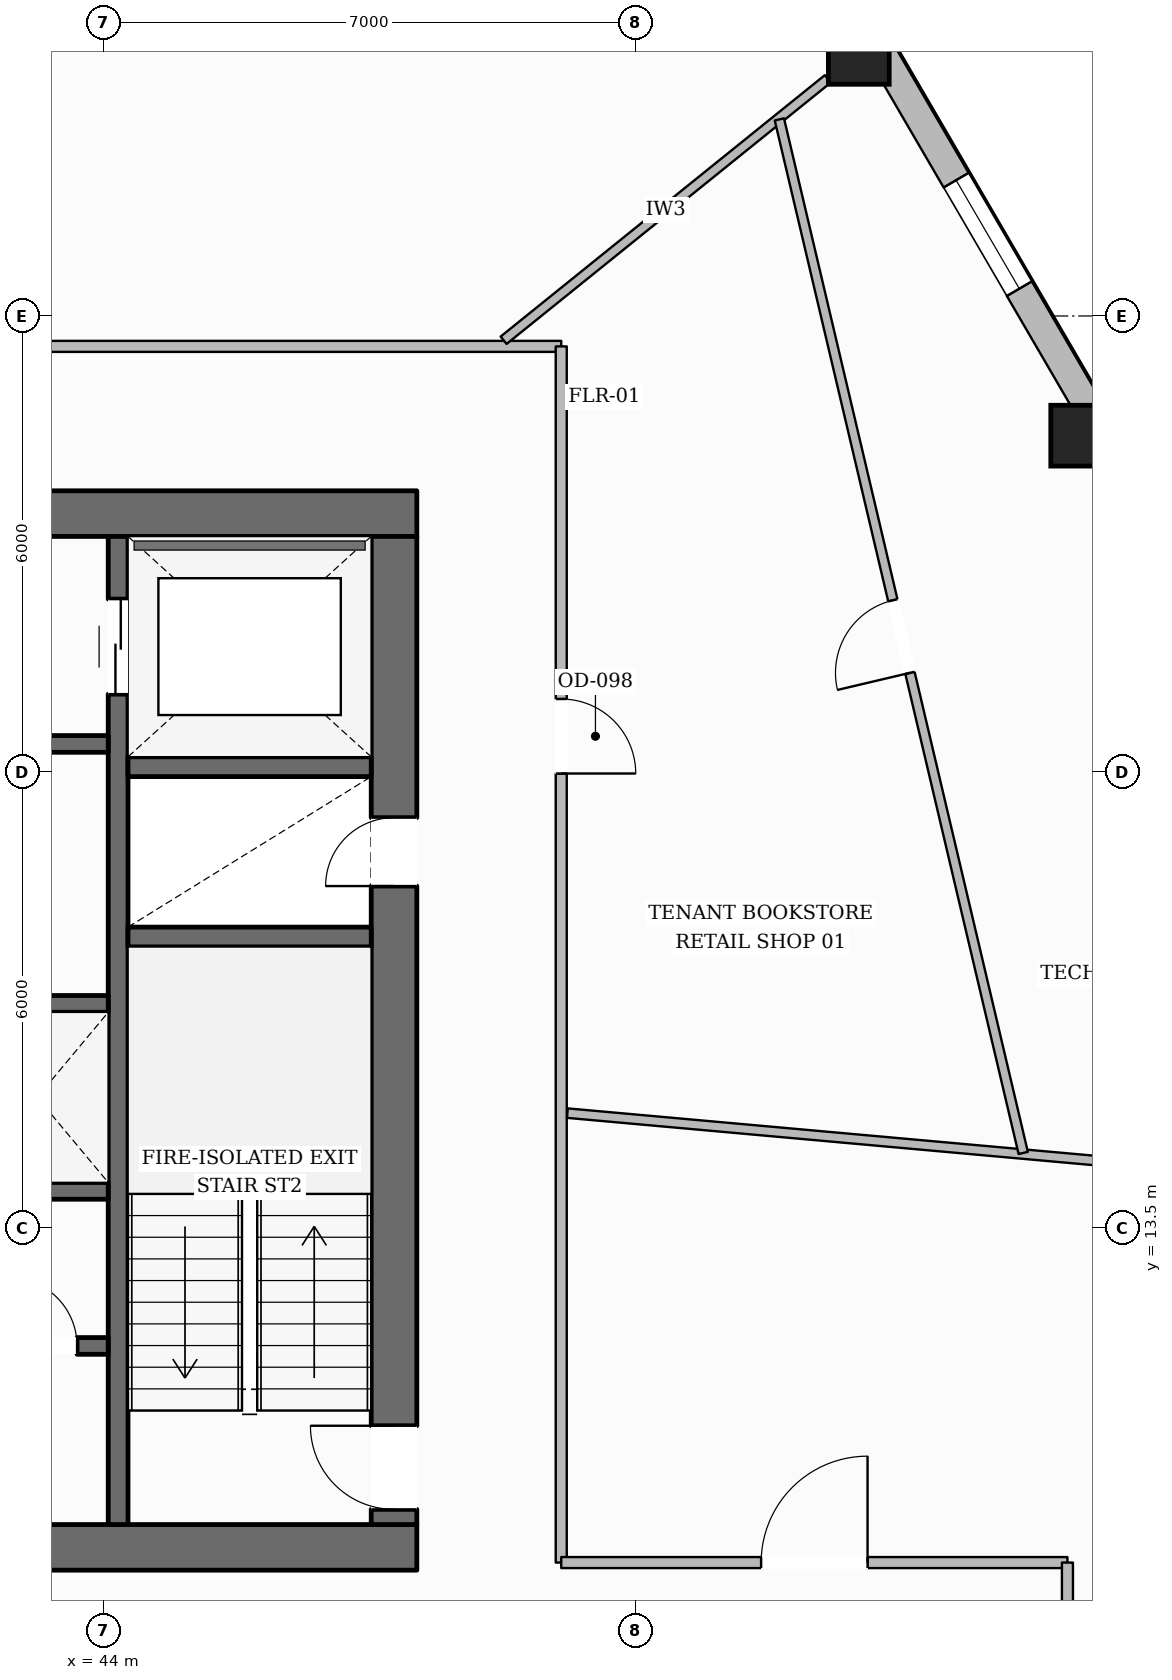
"""IFC4 building model, lengths in metres.
Left out: names, types, materials, properties, quantities, classifications, styles, units other than length and angle.
Written with IfcOpenShell. Run it as: python <this file> out.ifc"""

import sys

from ifc_helpers import new_model, si_unit, direction, frame, frame_2d, origin, origin_2d, place, context, subcontext, project, spatial, rectangle, hollow_rectangle, extrude, element, fill, save


model = new_model("IFC4")
c1 = context("Model", 3, precision=1e-05, world=origin(), true_north=direction((0.0, 1.0)))
c2 = subcontext(c1, "Body", "Model", "MODEL_VIEW")
j1 = project(units=[si_unit("LENGTHUNIT", "METRE"), si_unit("PLANEANGLEUNIT", "RADIAN")], contexts=[c1])
p1 = place(None, origin())
s1 = spatial("IfcSite", under=j1, at=p1, CompositionType="ELEMENT")
p2 = place(p1, origin())
s2 = spatial("IfcBuilding", under=s1, at=p2, CompositionType="ELEMENT")
p3 = place(p2, frame((0.0, 0.0, 63.75)))
s3 = spatial("IfcBuildingStorey", under=s2, at=p3, CompositionType="ELEMENT", Elevation=63.75)
p4 = place(p3, frame((27.88, 9.3, 0.0), z_axis=(0.0, 0.0, 1.0), x_axis=(1.0, 0.0, 0.0)))
e1 = element("IfcWall", 1, at=p4, inside=s3, PredefinedType="SOLIDWALL", context=c2, shape_type="SweptSolid", body=[
    extrude(rectangle(XDim=20.24, YDim=0.6, at=frame_2d((10.12, 0.0))), origin(), (0.0, 0.0, 1.0), 3.59),
])
p5 = place(p4, frame((10.62, 0.0, 0.0)))
e2 = element("IfcOpeningElement", 2, at=p5, cuts=e1, PredefinedType="OPENING", context=c2, shape_type="SweptSolid", body=[
    extrude(rectangle(XDim=1.4, YDim=2.2, at=frame_2d((0.7, 1.1))), frame((0.0, 0.31, 0.0), z_axis=(0.0, -1.0, 0.0), x_axis=(1.0, 0.0, 0.0)), (0.0, 0.0, 1.0), 0.62),
])
p6 = place(p3, frame((27.88, 22.9, 0.0), z_axis=(0.0, 0.0, 1.0), x_axis=(1.0, 0.0, 0.0)))
e3 = element("IfcWall", 3, at=p6, inside=s3, PredefinedType="SOLIDWALL", context=c2, shape_type="SweptSolid", body=[
    extrude(rectangle(XDim=20.24, YDim=0.6, at=frame_2d((10.12, 0.0))), origin(), (0.0, 0.0, 1.0), 3.59),
])
p7 = place(p6, frame((6.395, 0.0, 0.0)))
e4 = element("IfcOpeningElement", 4, at=p7, cuts=e3, PredefinedType="OPENING", context=c2, shape_type="SweptSolid", body=[
    extrude(rectangle(XDim=1.05, YDim=2.15, at=frame_2d((0.525, 1.075))), frame((0.0, 0.31, 0.0), z_axis=(0.0, -1.0, 0.0), x_axis=(1.0, 0.0, 0.0)), (0.0, 0.0, 1.0), 0.62),
])
p8 = place(p6, frame((12.795, 0.0, 0.0)))
e5 = element("IfcOpeningElement", 5, at=p8, cuts=e3, PredefinedType="OPENING", context=c2, shape_type="SweptSolid", body=[
    extrude(rectangle(XDim=1.05, YDim=2.15, at=frame_2d((0.525, 1.075))), frame((0.0, 0.31, 0.0), z_axis=(0.0, -1.0, 0.0), x_axis=(1.0, 0.0, 0.0)), (0.0, 0.0, 1.0), 0.62),
])
p9 = place(p3, frame((47.82, 9.6, 0.0), z_axis=(0.0, 0.0, 1.0), x_axis=(0.0, 1.0, 0.0)))
e6 = element("IfcWall", 6, at=p9, inside=s3, PredefinedType="SOLIDWALL", context=c2, shape_type="SweptSolid", body=[
    extrude(rectangle(XDim=13.0, YDim=0.6, at=frame_2d((6.5, 0.0))), origin(), (0.0, 0.0, 1.0), 3.59),
])
p10 = place(p9, frame((0.2, 0.0, 0.0)))
e7 = element("IfcOpeningElement", 7, at=p10, cuts=e6, PredefinedType="OPENING", context=c2, shape_type="SweptSolid", body=[
    extrude(rectangle(XDim=1.1, YDim=2.15, at=frame_2d((0.55, 1.075))), frame((0.0, 0.31, 0.0), z_axis=(0.0, -1.0, 0.0), x_axis=(1.0, 0.0, 0.0)), (0.0, 0.0, 1.0), 0.62),
])
p11 = place(p9, frame((8.4, 0.0, 0.0)))
e8 = element("IfcOpeningElement", 8, at=p11, cuts=e6, PredefinedType="OPENING", context=c2, shape_type="SweptSolid", body=[
    extrude(rectangle(XDim=0.9, YDim=2.1, at=frame_2d((0.45, 1.05))), frame((0.0, 0.31, 0.0), z_axis=(0.0, -1.0, 0.0), x_axis=(1.0, 0.0, 0.0)), (0.0, 0.0, 1.0), 0.62),
])
p12 = place(p3, frame((44.19, 9.6, 0.0), z_axis=(0.0, 0.0, 1.0), x_axis=(0.0, 1.0, 0.0)))
e9 = element("IfcWall", 9, at=p12, inside=s3, PredefinedType="SHEAR", context=c2, shape_type="SweptSolid", body=[
    extrude(rectangle(XDim=13.0, YDim=0.26, at=frame_2d((6.5, 0.0))), origin(), (0.0, 0.0, 1.0), 3.59),
])
p13 = place(p12, frame((10.925, 0.0, 0.0)))
e10 = element("IfcOpeningElement", 10, at=p13, cuts=e9, PredefinedType="OPENING", context=c2, shape_type="SweptSolid", body=[
    extrude(rectangle(XDim=1.25, YDim=2.25, at=frame_2d((0.625, 1.125))), frame((0.0, 0.14, 0.0), z_axis=(0.0, -1.0, 0.0), x_axis=(1.0, 0.0, 0.0)), (0.0, 0.0, 1.0), 0.28),
])
for number, where, z_axis, x_axis in (
    (11, (44.32, 17.33, 0.0), (0.0, 0.0, 1.0), (1.0, 0.0, 0.0)),
    (12, (44.32, 19.57, 0.0), (0.0, 0.0, 1.0), (1.0, 0.0, 0.0)),
):
    element("IfcWall", number, at=place(p3, frame(where, z_axis=z_axis, x_axis=x_axis)), inside=s3, PredefinedType="SHEAR", context=c2, shape_type="SweptSolid", body=[
        extrude(rectangle(XDim=3.2, YDim=0.26, at=frame_2d((1.6, 0.0))), origin(), (0.0, 0.0, 1.0), 3.59),
    ])
p14 = place(p3, frame((31.94, 19.87, 0.0), z_axis=(0.0, 0.0, 1.0), x_axis=(1.0, 0.0, 0.0)))
e13 = element("IfcWall", 13, at=p14, inside=s3, PredefinedType="SOLIDWALL", context=c2, shape_type="SweptSolid", body=[
    extrude(rectangle(XDim=12.12, YDim=0.22, at=frame_2d((6.06, 0.0))), origin(), (0.0, 0.0, 1.0), 3.59),
])
p15 = place(p14, frame((6.3, 0.0, 0.0)))
e14 = element("IfcOpeningElement", 14, at=p15, cuts=e13, PredefinedType="OPENING", context=c2, shape_type="SweptSolid", body=[
    extrude(rectangle(XDim=1.1, YDim=2.15, at=frame_2d((0.55, 1.075))), frame((0.0, 0.12, 0.0), z_axis=(0.0, -1.0, 0.0), x_axis=(1.0, 0.0, 0.0)), (0.0, 0.0, 1.0), 0.24),
])
p16 = place(p14, frame((9.51, 0.0, 0.0)))
e15 = element("IfcOpeningElement", 15, at=p16, cuts=e13, PredefinedType="OPENING", context=c2, shape_type="SweptSolid", body=[
    extrude(rectangle(XDim=0.9, YDim=2.1, at=frame_2d((0.45, 1.05))), frame((0.0, 0.12, 0.0), z_axis=(0.0, -1.0, 0.0), x_axis=(1.0, 0.0, 0.0)), (0.0, 0.0, 1.0), 0.24),
])
p17 = place(p3, frame((31.94, 16.45, 0.0), z_axis=(0.0, 0.0, 1.0), x_axis=(1.0, 0.0, 0.0)))
e16 = element("IfcWall", 16, at=p17, inside=s3, PredefinedType="SOLIDWALL", context=c2, shape_type="SweptSolid", body=[
    extrude(rectangle(XDim=12.12, YDim=0.22, at=frame_2d((6.06, 0.0))), origin(), (0.0, 0.0, 1.0), 3.59),
])
p18 = place(p3, frame((31.94, 13.99, 0.0), z_axis=(0.0, 0.0, 1.0), x_axis=(1.0, 0.0, 0.0)))
e17 = element("IfcWall", 17, at=p18, inside=s3, PredefinedType="SOLIDWALL", context=c2, shape_type="SweptSolid", body=[
    extrude(rectangle(XDim=12.12, YDim=0.22, at=frame_2d((6.06, 0.0))), origin(), (0.0, 0.0, 1.0), 3.59),
])
p19 = place(p18, frame((0.385, 0.0, 0.0)))
e18 = element("IfcOpeningElement", 18, at=p19, cuts=e17, PredefinedType="OPENING", context=c2, shape_type="SweptSolid", body=[
    extrude(rectangle(XDim=1.1, YDim=2.2, at=frame_2d((0.55, 1.1))), frame((0.0, 0.12, 0.0), z_axis=(0.0, -1.0, 0.0), x_axis=(1.0, 0.0, 0.0)), (0.0, 0.0, 1.0), 0.24),
])
p20 = place(p18, frame((2.435, 0.0, 0.0)))
e19 = element("IfcOpeningElement", 19, at=p20, cuts=e17, PredefinedType="OPENING", context=c2, shape_type="SweptSolid", body=[
    extrude(rectangle(XDim=1.1, YDim=2.2, at=frame_2d((0.55, 1.1))), frame((0.0, 0.12, 0.0), z_axis=(0.0, -1.0, 0.0), x_axis=(1.0, 0.0, 0.0)), (0.0, 0.0, 1.0), 0.24),
])
p21 = place(p18, frame((4.485, 0.0, 0.0)))
e20 = element("IfcOpeningElement", 20, at=p21, cuts=e17, PredefinedType="OPENING", context=c2, shape_type="SweptSolid", body=[
    extrude(rectangle(XDim=1.1, YDim=2.2, at=frame_2d((0.55, 1.1))), frame((0.0, 0.12, 0.0), z_axis=(0.0, -1.0, 0.0), x_axis=(1.0, 0.0, 0.0)), (0.0, 0.0, 1.0), 0.24),
])
p22 = place(p3, frame((40.28, 11.95, 0.0), z_axis=(0.0, 0.0, 1.0), x_axis=(1.0, 0.0, 0.0)))
e21 = element("IfcWall", 21, at=p22, inside=s3, PredefinedType="SOLIDWALL", context=c2, shape_type="SweptSolid", body=[
    extrude(rectangle(XDim=3.78, YDim=0.22, at=frame_2d((1.89, 0.0))), origin(), (0.0, 0.0, 1.0), 3.59),
])
p23 = place(p22, frame((0.62, 0.0, 0.0)))
e22 = element("IfcOpeningElement", 22, at=p23, cuts=e21, PredefinedType="OPENING", context=c2, shape_type="SweptSolid", body=[
    extrude(rectangle(XDim=0.9, YDim=2.1, at=frame_2d((0.45, 1.05))), frame((0.0, 0.12, 0.0), z_axis=(0.0, -1.0, 0.0), x_axis=(1.0, 0.0, 0.0)), (0.0, 0.0, 1.0), 0.24),
])
p24 = place(p22, frame((2.47, 0.0, 0.0)))
e23 = element("IfcOpeningElement", 23, at=p24, cuts=e21, PredefinedType="OPENING", context=c2, shape_type="SweptSolid", body=[
    extrude(rectangle(XDim=0.9, YDim=2.1, at=frame_2d((0.45, 1.05))), frame((0.0, 0.12, 0.0), z_axis=(0.0, -1.0, 0.0), x_axis=(1.0, 0.0, 0.0)), (0.0, 0.0, 1.0), 0.24),
])
for number, where, z_axis, x_axis in (
    (24, (56.861, 23.925, 0.0), (0.0, 0.0, 1.0), (1.0, 0.0, 0.0)),
    (25, (53.935, 28.948, 0.0), (0.0, 0.0, 1.0), (1.0, 0.0, 0.0)),
):
    element("IfcColumn", number, at=place(p3, frame(where, z_axis=z_axis, x_axis=x_axis)), inside=s3, PredefinedType="COLUMN", context=c2, shape_type="SweptSolid", body=[
        extrude(hollow_rectangle(XDim=0.8, YDim=0.8, WallThickness=0.036, at=origin_2d()), origin(), (0.0, 0.0, 1.0), 3.59),
    ])
p25 = place(p3, frame((63.188, 14.157, 0.0), z_axis=(0.0, 0.0, 1.0), x_axis=(-0.505432272737, -0.862866280299, 0.0)))
e26 = element("IfcWall", 26, at=p25, inside=s3, PredefinedType="STANDARD", context=c2, shape_type="SweptSolid", body=[
    extrude(rectangle(XDim=15.228, YDim=0.3, at=frame_2d((7.614, 0.0))), origin(), (0.0, 0.0, 1.0), 2.97),
])
p26 = place(p25, frame((7.014, 0.0, 0.65)))
e27 = element("IfcOpeningElement", 27, at=p26, cuts=e26, PredefinedType="OPENING", context=c2, shape_type="SweptSolid", body=[
    extrude(rectangle(XDim=1.2, YDim=1.7, at=frame_2d((0.6, 0.85))), frame((0.0, 0.16, 0.0), z_axis=(0.0, -1.0, 0.0), x_axis=(1.0, 0.0, 0.0)), (0.0, 0.0, 1.0), 0.32),
])
p27 = place(p3, frame((45.15, 44.565, 0.0), z_axis=(0.0, 0.0, 1.0), x_axis=(0.503346513102, -0.864084653114, 0.0)))
e28 = element("IfcWall", 28, at=p27, inside=s3, PredefinedType="STANDARD", context=c2, shape_type="SweptSolid", body=[
    extrude(rectangle(XDim=35.835, YDim=0.38, at=frame_2d((17.917, 0.0))), origin(), (0.0, 0.0, 1.0), 2.97),
])
p28 = place(p27, frame((26.276, 0.0, 0.0)))
e29 = element("IfcOpeningElement", 29, at=p28, cuts=e28, PredefinedType="OPENING", context=c2, shape_type="SweptSolid", body=[
    extrude(rectangle(XDim=1.0, YDim=2.2, at=frame_2d((0.5, 1.1))), frame((0.0, 0.2, 0.0), z_axis=(0.0, -1.0, 0.0), x_axis=(1.0, 0.0, 0.0)), (0.0, 0.0, 1.0), 0.4),
])
p29 = place(p27, frame((31.623, 0.0, 0.65)))
e30 = element("IfcOpeningElement", 30, at=p29, cuts=e28, PredefinedType="OPENING", context=c2, shape_type="SweptSolid", body=[
    extrude(rectangle(XDim=1.65, YDim=1.75, at=frame_2d((0.825, 0.875))), frame((0.0, 0.2, 0.0), z_axis=(0.0, -1.0, 0.0), x_axis=(1.0, 0.0, 0.0)), (0.0, 0.0, 1.0), 0.4),
])
p30 = place(p27, frame((19.997, 0.0, 0.65)))
e31 = element("IfcOpeningElement", 31, at=p30, cuts=e28, PredefinedType="OPENING", context=c2, shape_type="SweptSolid", body=[
    extrude(rectangle(XDim=1.65, YDim=1.75, at=frame_2d((0.825, 0.875))), frame((0.0, 0.2, 0.0), z_axis=(0.0, -1.0, 0.0), x_axis=(1.0, 0.0, 0.0)), (0.0, 0.0, 1.0), 0.4),
])
p31 = place(p27, frame((8.371, 0.0, 0.65)))
e32 = element("IfcOpeningElement", 32, at=p31, cuts=e28, PredefinedType="OPENING", context=c2, shape_type="SweptSolid", body=[
    extrude(rectangle(XDim=1.65, YDim=1.75, at=frame_2d((0.825, 0.875))), frame((0.0, 0.2, 0.0), z_axis=(0.0, -1.0, 0.0), x_axis=(1.0, 0.0, 0.0)), (0.0, 0.0, 1.0), 0.4),
])
p32 = place(p27, frame((2.558, 0.0, 0.65)))
e33 = element("IfcOpeningElement", 33, at=p32, cuts=e28, PredefinedType="OPENING", context=c2, shape_type="SweptSolid", body=[
    extrude(rectangle(XDim=1.65, YDim=1.75, at=frame_2d((0.825, 0.875))), frame((0.0, 0.2, 0.0), z_axis=(0.0, -1.0, 0.0), x_axis=(1.0, 0.0, 0.0)), (0.0, 0.0, 1.0), 0.4),
])
p33 = place(p3, frame((39.0, 25.1, 0.0), z_axis=(0.0, 0.0, 1.0), x_axis=(1.0, 0.0, 0.0)))
e34 = element("IfcWall", 34, at=p33, inside=s3, PredefinedType="PARTITIONING", context=c2, shape_type="SweptSolid", body=[
    extrude(rectangle(XDim=11.02, YDim=0.145, at=frame_2d((5.51, 0.0))), origin(), (0.0, 0.0, 1.0), 3.59),
])
p34 = place(p3, frame((50.02, 25.1, 0.0), z_axis=(0.0, 0.0, 1.0), x_axis=(0.0, -1.0, 0.0)))
e35 = element("IfcWall", 35, at=p34, inside=s3, PredefinedType="PARTITIONING", context=c2, shape_type="SweptSolid", body=[
    extrude(rectangle(XDim=16.0, YDim=0.145, at=frame_2d((8.0, 0.0))), origin(), (0.0, 0.0, 1.0), 3.278),
])
p35 = place(p34, frame((4.639, 0.0, 0.0)))
e36 = element("IfcOpeningElement", 36, at=p35, cuts=e35, PredefinedType="OPENING", context=c2, shape_type="SweptSolid", body=[
    extrude(rectangle(XDim=0.98, YDim=2.15, at=frame_2d((0.49, 1.075))), frame((0.0, 0.083, 0.0), z_axis=(0.0, -1.0, 0.0), x_axis=(1.0, 0.0, 0.0)), (0.0, 0.0, 1.0), 0.165),
])
p36 = place(p3, frame((50.02, 9.1, 0.0), z_axis=(0.0, 0.0, 1.0), x_axis=(1.0, 0.0, 0.0)))
e37 = element("IfcWall", 37, at=p36, inside=s3, PredefinedType="PARTITIONING", context=c2, shape_type="SweptSolid", body=[
    extrude(rectangle(XDim=6.659, YDim=0.145, at=frame_2d((3.33, 0.0))), origin(), (0.0, 0.0, 1.0), 3.59),
])
p37 = place(p36, frame((2.63, 0.0, 0.0)))
e38 = element("IfcOpeningElement", 38, at=p37, cuts=e37, PredefinedType="OPENING", context=c2, shape_type="SweptSolid", body=[
    extrude(rectangle(XDim=1.4, YDim=2.2, at=frame_2d((0.7, 1.1))), frame((0.0, 0.083, 0.0), z_axis=(0.0, -1.0, 0.0), x_axis=(1.0, 0.0, 0.0)), (0.0, 0.0, 1.0), 0.165),
])
p38 = place(p3, frame((56.679, 9.1, 0.0), z_axis=(0.0, 0.0, 1.0), x_axis=(0.0, -1.0, 0.0)))
e39 = element("IfcWall", 39, at=p38, inside=s3, PredefinedType="PARTITIONING", context=c2, shape_type="SweptSolid", body=[
    extrude(rectangle(XDim=2.0, YDim=0.145, at=frame_2d((1.0, 0.0))), origin(), (0.0, 0.0, 1.0), 3.59),
])
p39 = place(p3, frame((49.262, 25.18, 0.0), z_axis=(0.0, 0.0, 1.0), x_axis=(0.778476255844, 0.627674054815, 0.0)))
e40 = element("IfcWall", 40, at=p39, inside=s3, PredefinedType="PARTITIONING", context=c2, shape_type="SweptSolid", body=[
    extrude(rectangle(XDim=5.479, YDim=0.125, at=frame_2d((2.739, 0.0))), origin(), (0.0, 0.0, 1.0), 3.057),
])
p40 = place(p3, frame((50.101, 15.013, 0.0), z_axis=(0.0, 0.0, 1.0), x_axis=(0.995987233075, -0.089495427542, 0.0)))
e41 = element("IfcWall", 41, at=p40, inside=s3, PredefinedType="PARTITIONING", context=c2, shape_type="SweptSolid", body=[
    extrude(rectangle(XDim=12.273, YDim=0.125, at=frame_2d((6.137, 0.0))), origin(), (0.0, 0.0, 1.0), 3.057),
])
p41 = place(p3, frame((56.098, 14.489, 0.0), z_axis=(0.0, 0.0, 1.0), x_axis=(-0.229640261557, 0.973275577764, 0.0)))
e42 = element("IfcWall", 42, at=p41, inside=s3, PredefinedType="PARTITIONING", context=c2, shape_type="SweptSolid", body=[
    extrude(rectangle(XDim=13.971, YDim=0.125, at=frame_2d((6.985, 0.0))), origin(), (0.0, 0.0, 1.0), 3.278),
])
p42 = place(p41, frame((6.49, 0.0, 0.0)))
e43 = element("IfcOpeningElement", 43, at=p42, cuts=e42, PredefinedType="OPENING", context=c2, shape_type="SweptSolid", body=[
    extrude(rectangle(XDim=0.98, YDim=2.15, at=frame_2d((0.49, 1.075))), frame((0.0, 0.073, 0.0), z_axis=(0.0, -1.0, 0.0), x_axis=(1.0, 0.0, 0.0)), (0.0, 0.0, 1.0), 0.145),
])
p43 = place(p30, origin())
e44 = element("IfcWindow", 44, at=p43, inside=s3, PartitioningType="SINGLE_PANEL", PredefinedType="WINDOW", context=c2, shape_type="SweptSolid", body=[
    extrude(rectangle(XDim=1.65, YDim=1.75, at=frame_2d((0.825, 0.875))), frame((0.0, 0.03, 0.0), z_axis=(0.0, -1.0, 0.0), x_axis=(1.0, 0.0, 0.0)), (0.0, 0.0, 1.0), 0.06),
])
fill(e31, e44)
p44 = place(p10, origin())
e45 = element("IfcDoor", 45, at=p44, inside=s3, OperationType="SINGLE_SWING_RIGHT", PredefinedType="DOOR", context=c2, shape_type="SweptSolid", body=[
    extrude(rectangle(XDim=1.1, YDim=2.15, at=frame_2d((0.55, 1.075))), frame((0.0, 0.025, 0.0), z_axis=(0.0, -1.0, 0.0), x_axis=(1.0, 0.0, 0.0)), (0.0, 0.0, 1.0), 0.05),
])
fill(e7, e45)
p45 = place(p11, origin())
e46 = element("IfcDoor", 46, at=p45, inside=s3, OperationType="SINGLE_SWING_LEFT", PredefinedType="DOOR", context=c2, shape_type="SweptSolid", body=[
    extrude(rectangle(XDim=0.9, YDim=2.1, at=frame_2d((0.45, 1.05))), frame((0.0, 0.025, 0.0), z_axis=(0.0, -1.0, 0.0), x_axis=(1.0, 0.0, 0.0)), (0.0, 0.0, 1.0), 0.05),
])
fill(e8, e46)
p46 = place(p13, origin())
e47 = element("IfcDoor", 47, at=p46, inside=s3, OperationType="DOUBLE_DOOR_SLIDING", PredefinedType="DOOR", context=c2, shape_type="SweptSolid", body=[
    extrude(rectangle(XDim=1.25, YDim=2.25, at=frame_2d((0.625, 1.125))), frame((0.0, 0.025, 0.0), z_axis=(0.0, -1.0, 0.0), x_axis=(1.0, 0.0, 0.0)), (0.0, 0.0, 1.0), 0.05),
])
fill(e10, e47)
p47 = place(p24, origin())
e48 = element("IfcDoor", 48, at=p47, inside=s3, OperationType="SINGLE_SWING_LEFT", PredefinedType="DOOR", context=c2, shape_type="SweptSolid", body=[
    extrude(rectangle(XDim=0.9, YDim=2.1, at=frame_2d((0.45, 1.05))), frame((0.0, 0.025, 0.0), z_axis=(0.0, -1.0, 0.0), x_axis=(1.0, 0.0, 0.0)), (0.0, 0.0, 1.0), 0.05),
])
fill(e23, e48)
p48 = place(p35, origin())
e49 = element("IfcDoor", 49, at=p48, inside=s3, OperationType="SINGLE_SWING_RIGHT", PredefinedType="DOOR", context=c2, shape_type="SweptSolid", body=[
    extrude(rectangle(XDim=0.98, YDim=2.15, at=frame_2d((0.49, 1.075))), frame((0.0, 0.025, 0.0), z_axis=(0.0, -1.0, 0.0), x_axis=(1.0, 0.0, 0.0)), (0.0, 0.0, 1.0), 0.05),
])
fill(e36, e49)
p49 = place(p42, origin())
e50 = element("IfcDoor", 50, at=p49, inside=s3, OperationType="SINGLE_SWING_LEFT", PredefinedType="DOOR", context=c2, shape_type="SweptSolid", body=[
    extrude(rectangle(XDim=0.98, YDim=2.15, at=frame_2d((0.49, 1.075))), frame((0.0, 0.025, 0.0), z_axis=(0.0, -1.0, 0.0), x_axis=(1.0, 0.0, 0.0)), (0.0, 0.0, 1.0), 0.05),
])
fill(e43, e50)
p50 = place(p37, origin())
e51 = element("IfcDoor", 51, at=p50, inside=s3, OperationType="SINGLE_SWING_RIGHT", PredefinedType="DOOR", context=c2, shape_type="SweptSolid", body=[
    extrude(rectangle(XDim=1.4, YDim=2.2, at=frame_2d((0.7, 1.1))), frame((0.0, 0.025, 0.0), z_axis=(0.0, -1.0, 0.0), x_axis=(1.0, 0.0, 0.0)), (0.0, 0.0, 1.0), 0.05),
])
fill(e38, e51)
save(model, sys.argv[1])
